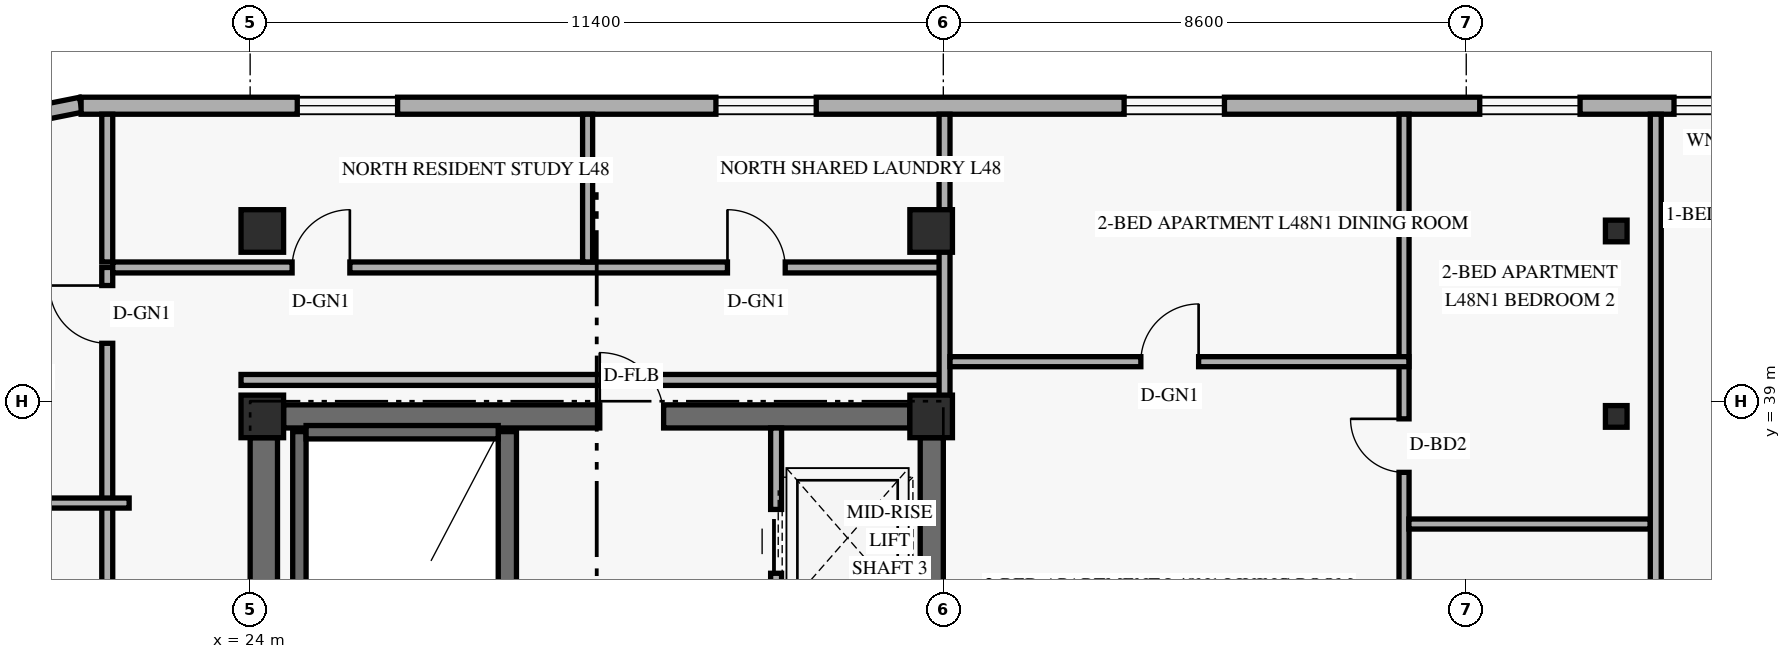
"""IFC4 building model, lengths in metres.
Left out: names, types, materials, properties, quantities, classifications, styles, units other than length and angle.
Written with IfcOpenShell. Run it as: python <this file> out.ifc"""

import sys

from ifc_helpers import new_model, si_unit, direction, frame, frame_2d, origin, origin_2d, place, context, subcontext, project, spatial, rectangle, hollow_rectangle, extrude, element, fill, save


model = new_model("IFC4")
c1 = context("Model", 3, precision=1e-05, world=origin(), true_north=direction((0.0, 1.0)))
c2 = subcontext(c1, "Body", "Model", "MODEL_VIEW")
j1 = project(units=[si_unit("LENGTHUNIT", "METRE"), si_unit("PLANEANGLEUNIT", "RADIAN")], contexts=[c1])
p1 = place(None, origin())
s1 = spatial("IfcSite", under=j1, at=p1, CompositionType="ELEMENT")
p2 = place(p1, origin())
s2 = spatial("IfcBuilding", under=s1, at=p2, CompositionType="ELEMENT")
p3 = place(p2, frame((0.0, 0.0, 184.8)))
s3 = spatial("IfcBuildingStorey", under=s2, at=p3, CompositionType="ELEMENT", Elevation=184.8)
p4 = place(p3, frame((24.225, 30.55, 0.0), z_axis=(0.0, 0.0, 1.0), x_axis=(0.0, 1.0, 0.0)))
e1 = element("IfcWall", 1, at=p4, inside=s3, PredefinedType="SHEAR", context=c2, shape_type="SweptSolid", body=[
    extrude(rectangle(XDim=7.85, YDim=0.45, at=frame_2d((3.925, 0.0))), origin(), (0.0, 0.0, 1.0), 2.748),
])
p5 = place(p3, frame((35.21, 31.35, 0.0), z_axis=(0.0, 0.0, 1.0), x_axis=(0.0, 1.0, 0.0)))
e2 = element("IfcWall", 2, at=p5, inside=s3, PredefinedType="SHEAR", context=c2, shape_type="SweptSolid", body=[
    extrude(rectangle(XDim=7.05, YDim=0.38, at=frame_2d((3.525, 0.0))), origin(), (0.0, 0.0, 1.0), 2.748),
])
p6 = place(p3, frame((24.55, 38.75, 0.0), z_axis=(0.0, 0.0, 1.0), x_axis=(1.0, 0.0, 0.0)))
e3 = element("IfcWall", 3, at=p6, inside=s3, PredefinedType="SHEAR", context=c2, shape_type="SweptSolid", body=[
    extrude(rectangle(XDim=10.3, YDim=0.38, at=frame_2d((5.15, 0.0))), origin(), (0.0, 0.0, 1.0), 3.36),
])
p7 = place(p6, frame((5.2, 0.0, 0.0)))
e4 = element("IfcOpeningElement", 4, at=p7, cuts=e3, PredefinedType="OPENING", context=c2, shape_type="SweptSolid", body=[
    extrude(rectangle(XDim=1.05, YDim=2.15, at=frame_2d((0.525, 1.075))), frame((0.0, 0.2, 0.0), z_axis=(0.0, -1.0, 0.0), x_axis=(1.0, 0.0, 0.0)), (0.0, 0.0, 1.0), 0.4),
])
p8 = place(p3, frame((24.81, 30.74, 0.0), z_axis=(0.0, 0.0, 1.0), x_axis=(0.0, 1.0, 0.0)))
e5 = element("IfcWall", 5, at=p8, inside=s3, PredefinedType="SHEAR", context=c2, shape_type="SweptSolid", body=[
    extrude(rectangle(XDim=7.76, YDim=0.22, at=frame_2d((3.88, 0.0))), origin(), (0.0, 0.0, 1.0), 3.36),
])
p9 = place(p3, frame((28.23, 30.74, 0.0), z_axis=(0.0, 0.0, 1.0), x_axis=(0.0, 1.0, 0.0)))
e6 = element("IfcWall", 6, at=p9, inside=s3, PredefinedType="SHEAR", context=c2, shape_type="SweptSolid", body=[
    extrude(rectangle(XDim=7.76, YDim=0.3, at=frame_2d((3.88, 0.0))), origin(), (0.0, 0.0, 1.0), 3.36),
])
p10 = place(p3, frame((24.92, 38.49, 0.0), z_axis=(0.0, 0.0, 1.0), x_axis=(1.0, 0.0, 0.0)))
e7 = element("IfcWall", 7, at=p10, inside=s3, PredefinedType="SHEAR", context=c2, shape_type="SweptSolid", body=[
    extrude(rectangle(XDim=3.16, YDim=0.22, at=frame_2d((1.58, 0.0))), origin(), (0.0, 0.0, 1.0), 3.36),
])
for number, where, z_axis, x_axis in (
    (8, (24.2, 38.75, 0.0), (0.0, 0.0, 1.0), (1.0, 0.0, 0.0)),
    (9, (24.2, 41.8, 0.0), (0.0, 0.0, 1.0), (1.0, 0.0, 0.0)),
    (10, (35.2, 38.75, 0.0), (0.0, 0.0, 1.0), (1.0, 0.0, 0.0)),
    (11, (35.2, 41.8, 0.0), (0.0, 0.0, 1.0), (1.0, 0.0, 0.0)),
):
    element("IfcColumn", number, at=place(p3, frame(where, z_axis=z_axis, x_axis=x_axis)), inside=s3, PredefinedType="COLUMN", context=c2, shape_type="SweptSolid", body=[
        extrude(rectangle(XDim=0.7, YDim=0.7, at=origin_2d()), origin(), (0.0, 0.0, 1.0), 3.6),
    ])
for number, where, z_axis, x_axis in (
    (12, (46.404, 38.75, 0.0), (0.035, 0.0, 0.999), (0.0, 1.0, 0.0)),
    (13, (46.404, 41.8, 0.0), (0.035, 0.0, 0.999), (0.0, 1.0, 0.0)),
):
    element("IfcColumn", number, at=place(p3, frame(where, z_axis=z_axis, x_axis=x_axis)), inside=s3, PredefinedType="COLUMN", context=c2, shape_type="SweptSolid", body=[
        extrude(hollow_rectangle(XDim=0.356, YDim=0.356, WallThickness=0.016, at=origin_2d()), origin(), (0.0, 0.0, 1.0), 3.602),
    ])
p11 = place(p3, frame((21.217, 43.876, 0.0), z_axis=(0.0, 0.0, 1.0), x_axis=(-0.980809899341, -0.19496651342, 0.0)))
e14 = element("IfcWall", 14, at=p11, inside=s3, PredefinedType="SOLIDWALL", context=c2, shape_type="SweptSolid", body=[
    extrude(rectangle(XDim=1.389, YDim=0.25, at=frame_2d((0.694, 0.0))), origin(), (0.0, 0.0, 1.0), 3.36),
])
p12 = place(p3, frame((54.98, 43.86, 0.0), z_axis=(0.0, 0.0, 1.0), x_axis=(-1.0, 0.0, 0.0)))
e15 = element("IfcWall", 15, at=p12, inside=s3, PredefinedType="SOLIDWALL", context=c2, shape_type="SweptSolid", body=[
    extrude(rectangle(XDim=33.76, YDim=0.28, at=frame_2d((16.88, 0.0))), origin(), (0.0, 0.0, 1.0), 3.36),
])
p13 = place(p12, frame((28.555, 0.0, 0.85)))
e16 = element("IfcOpeningElement", 16, at=p13, cuts=e15, PredefinedType="OPENING", context=c2, shape_type="SweptSolid", body=[
    extrude(rectangle(XDim=1.65, YDim=1.6, at=frame_2d((0.825, 0.8))), frame((0.0, 0.15, 0.0), z_axis=(0.0, -1.0, 0.0), x_axis=(1.0, 0.0, 0.0)), (0.0, 0.0, 1.0), 0.3),
])
p14 = place(p12, frame((21.67, 0.0, 0.85)))
e17 = element("IfcOpeningElement", 17, at=p14, cuts=e15, PredefinedType="OPENING", context=c2, shape_type="SweptSolid", body=[
    extrude(rectangle(XDim=1.65, YDim=1.6, at=frame_2d((0.825, 0.8))), frame((0.0, 0.15, 0.0), z_axis=(0.0, -1.0, 0.0), x_axis=(1.0, 0.0, 0.0)), (0.0, 0.0, 1.0), 0.3),
])
p15 = place(p12, frame((14.957, 0.0, 0.85)))
e18 = element("IfcOpeningElement", 18, at=p15, cuts=e15, PredefinedType="OPENING", context=c2, shape_type="SweptSolid", body=[
    extrude(rectangle(XDim=1.65, YDim=1.6, at=frame_2d((0.825, 0.8))), frame((0.0, 0.15, 0.0), z_axis=(0.0, -1.0, 0.0), x_axis=(1.0, 0.0, 0.0)), (0.0, 0.0, 1.0), 0.3),
])
p16 = place(p12, frame((9.108, 0.0, 0.85)))
e19 = element("IfcOpeningElement", 19, at=p16, cuts=e15, PredefinedType="OPENING", context=c2, shape_type="SweptSolid", body=[
    extrude(rectangle(XDim=1.65, YDim=1.6, at=frame_2d((0.825, 0.8))), frame((0.0, 0.15, 0.0), z_axis=(0.0, -1.0, 0.0), x_axis=(1.0, 0.0, 0.0)), (0.0, 0.0, 1.0), 0.3),
])
p17 = place(p12, frame((6.363, 0.0, 0.85)))
e20 = element("IfcOpeningElement", 20, at=p17, cuts=e15, PredefinedType="OPENING", context=c2, shape_type="SweptSolid", body=[
    extrude(rectangle(XDim=1.2, YDim=1.5, at=frame_2d((0.6, 0.75))), frame((0.0, 0.15, 0.0), z_axis=(0.0, -1.0, 0.0), x_axis=(1.0, 0.0, 0.0)), (0.0, 0.0, 1.0), 0.3),
])
p18 = place(p12, frame((2.207, 0.0, 0.85)))
e21 = element("IfcOpeningElement", 21, at=p18, cuts=e15, PredefinedType="OPENING", context=c2, shape_type="SweptSolid", body=[
    extrude(rectangle(XDim=1.65, YDim=1.6, at=frame_2d((0.825, 0.8))), frame((0.0, 0.15, 0.0), z_axis=(0.0, -1.0, 0.0), x_axis=(1.0, 0.0, 0.0)), (0.0, 0.0, 1.0), 0.3),
])
p19 = place(p3, frame((32.65, 31.35, 0.0), z_axis=(0.0, 0.0, 1.0), x_axis=(0.0, 1.0, 0.0)))
e22 = element("IfcWall", 22, at=p19, inside=s3, PredefinedType="STANDARD", context=c2, shape_type="SweptSolid", body=[
    extrude(rectangle(XDim=7.21, YDim=0.18, at=frame_2d((3.605, 0.0))), origin(), (0.0, 0.0, 1.0), 3.36),
])
p20 = place(p19, frame((0.52, 0.0, 0.0)))
e23 = element("IfcOpeningElement", 23, at=p20, cuts=e22, PredefinedType="OPENING", context=c2, shape_type="SweptSolid", body=[
    extrude(rectangle(XDim=1.05, YDim=2.2, at=frame_2d((0.525, 1.1))), frame((0.0, 0.1, 0.0), z_axis=(0.0, -1.0, 0.0), x_axis=(1.0, 0.0, 0.0)), (0.0, 0.0, 1.0), 0.2),
])
p21 = place(p19, frame((2.67, 0.0, 0.0)))
e24 = element("IfcOpeningElement", 24, at=p21, cuts=e22, PredefinedType="OPENING", context=c2, shape_type="SweptSolid", body=[
    extrude(rectangle(XDim=1.05, YDim=2.2, at=frame_2d((0.525, 1.1))), frame((0.0, 0.1, 0.0), z_axis=(0.0, -1.0, 0.0), x_axis=(1.0, 0.0, 0.0)), (0.0, 0.0, 1.0), 0.2),
])
p22 = place(p19, frame((4.82, 0.0, 0.0)))
e25 = element("IfcOpeningElement", 25, at=p22, cuts=e22, PredefinedType="OPENING", context=c2, shape_type="SweptSolid", body=[
    extrude(rectangle(XDim=1.05, YDim=2.2, at=frame_2d((0.525, 1.1))), frame((0.0, 0.1, 0.0), z_axis=(0.0, -1.0, 0.0), x_axis=(1.0, 0.0, 0.0)), (0.0, 0.0, 1.0), 0.2),
])
p23 = place(p3, frame((21.65, 6.8, 0.0), z_axis=(0.0, 0.0, 1.0), x_axis=(0.0, 1.0, 0.0)))
e26 = element("IfcWall", 26, at=p23, inside=s3, PredefinedType="STANDARD", context=c2, shape_type="SweptSolid", body=[
    extrude(rectangle(XDim=34.4, YDim=0.18, at=frame_2d((17.2, 0.0))), origin(), (0.0, 0.0, 1.0), 2.73),
])
p24 = place(p23, frame((0.433, 0.0, 0.0)))
e27 = element("IfcOpeningElement", 27, at=p24, cuts=e26, PredefinedType="OPENING", context=c2, shape_type="SweptSolid", body=[
    extrude(rectangle(XDim=0.95, YDim=2.15, at=frame_2d((0.475, 1.075))), frame((0.0, 0.1, 0.0), z_axis=(0.0, -1.0, 0.0), x_axis=(1.0, 0.0, 0.0)), (0.0, 0.0, 1.0), 0.2),
])
p25 = place(p23, frame((6.867, 0.0, 0.0)))
e28 = element("IfcOpeningElement", 28, at=p25, cuts=e26, PredefinedType="OPENING", context=c2, shape_type="SweptSolid", body=[
    extrude(rectangle(XDim=0.95, YDim=2.15, at=frame_2d((0.475, 1.075))), frame((0.0, 0.1, 0.0), z_axis=(0.0, -1.0, 0.0), x_axis=(1.0, 0.0, 0.0)), (0.0, 0.0, 1.0), 0.2),
])
p26 = place(p23, frame((13.17, 0.0, 0.0)))
e29 = element("IfcOpeningElement", 29, at=p26, cuts=e26, PredefinedType="OPENING", context=c2, shape_type="SweptSolid", body=[
    extrude(rectangle(XDim=0.95, YDim=2.15, at=frame_2d((0.475, 1.075))), frame((0.0, 0.1, 0.0), z_axis=(0.0, -1.0, 0.0), x_axis=(1.0, 0.0, 0.0)), (0.0, 0.0, 1.0), 0.2),
])
p27 = place(p23, frame((19.88, 0.0, 0.0)))
e30 = element("IfcOpeningElement", 30, at=p27, cuts=e26, PredefinedType="OPENING", context=c2, shape_type="SweptSolid", body=[
    extrude(rectangle(XDim=0.95, YDim=2.15, at=frame_2d((0.475, 1.075))), frame((0.0, 0.1, 0.0), z_axis=(0.0, -1.0, 0.0), x_axis=(1.0, 0.0, 0.0)), (0.0, 0.0, 1.0), 0.2),
])
p28 = place(p23, frame((26.857, 0.0, 0.0)))
e31 = element("IfcOpeningElement", 31, at=p28, cuts=e26, PredefinedType="OPENING", context=c2, shape_type="SweptSolid", body=[
    extrude(rectangle(XDim=0.95, YDim=2.15, at=frame_2d((0.475, 1.075))), frame((0.0, 0.1, 0.0), z_axis=(0.0, -1.0, 0.0), x_axis=(1.0, 0.0, 0.0)), (0.0, 0.0, 1.0), 0.2),
])
p29 = place(p23, frame((33.153, 0.0, 0.0)))
e32 = element("IfcOpeningElement", 32, at=p29, cuts=e26, PredefinedType="OPENING", context=c2, shape_type="SweptSolid", body=[
    extrude(rectangle(XDim=0.95, YDim=2.15, at=frame_2d((0.475, 1.075))), frame((0.0, 0.1, 0.0), z_axis=(0.0, -1.0, 0.0), x_axis=(1.0, 0.0, 0.0)), (0.0, 0.0, 1.0), 0.2),
])
p30 = place(p3, frame((21.74, 41.2, 0.0), z_axis=(0.0, 0.0, 1.0), x_axis=(1.0, 0.0, 0.0)))
e33 = element("IfcWall", 33, at=p30, inside=s3, PredefinedType="STANDARD", context=c2, shape_type="SweptSolid", body=[
    extrude(rectangle(XDim=13.68, YDim=0.18, at=frame_2d((6.84, 0.0))), origin(), (0.0, 0.0, 1.0), 2.73),
])
p31 = place(p30, frame((2.95, 0.0, 0.0)))
e34 = element("IfcOpeningElement", 34, at=p31, cuts=e33, PredefinedType="OPENING", context=c2, shape_type="SweptSolid", body=[
    extrude(rectangle(XDim=0.95, YDim=2.15, at=frame_2d((0.475, 1.075))), frame((0.0, 0.1, 0.0), z_axis=(0.0, -1.0, 0.0), x_axis=(1.0, 0.0, 0.0)), (0.0, 0.0, 1.0), 0.2),
])
p32 = place(p30, frame((10.11, 0.0, 0.0)))
e35 = element("IfcOpeningElement", 35, at=p32, cuts=e33, PredefinedType="OPENING", context=c2, shape_type="SweptSolid", body=[
    extrude(rectangle(XDim=0.95, YDim=2.15, at=frame_2d((0.475, 1.075))), frame((0.0, 0.1, 0.0), z_axis=(0.0, -1.0, 0.0), x_axis=(1.0, 0.0, 0.0)), (0.0, 0.0, 1.0), 0.2),
])
p33 = place(p3, frame((23.85, 39.35, 0.0), z_axis=(0.0, 0.0, 1.0), x_axis=(1.0, 0.0, 0.0)))
e36 = element("IfcWall", 36, at=p33, inside=s3, PredefinedType="STANDARD", context=c2, shape_type="SweptSolid", body=[
    extrude(rectangle(XDim=11.57, YDim=0.18, at=frame_2d((5.785, 0.0))), origin(), (0.0, 0.0, 1.0), 2.73),
])
p34 = place(p3, frame((21.65, 41.29, 0.0), z_axis=(0.0, 0.0, 1.0), x_axis=(0.0, 1.0, 0.0)))
e37 = element("IfcWall", 37, at=p34, inside=s3, PredefinedType="PARTITIONING", context=c2, shape_type="SweptSolid", body=[
    extrude(rectangle(XDim=2.43, YDim=0.18, at=frame_2d((1.215, 0.0))), origin(), (0.0, 0.0, 1.0), 2.879),
])
p35 = place(p3, frame((35.42, 38.75, 0.0), z_axis=(0.0, 0.0, 1.0), x_axis=(0.0, 1.0, 0.0)))
e38 = element("IfcWall", 38, at=p35, inside=s3, PredefinedType="PARTITIONING", context=c2, shape_type="SweptSolid", body=[
    extrude(rectangle(XDim=4.97, YDim=0.18, at=frame_2d((2.485, 0.0))), origin(), (0.0, 0.0, 1.0), 2.73),
])
p36 = place(p3, frame((42.977, 29.55, 0.0), z_axis=(0.0, 0.0, 1.0), x_axis=(0.0, 1.0, 0.0)))
e39 = element("IfcWall", 39, at=p36, inside=s3, PredefinedType="PARTITIONING", context=c2, shape_type="SweptSolid", body=[
    extrude(rectangle(XDim=14.17, YDim=0.165, at=frame_2d((7.085, 0.0))), origin(), (0.0, 0.0, 1.0), 2.73),
])
p37 = place(p36, frame((4.593, 0.0, 0.0)))
e40 = element("IfcOpeningElement", 40, at=p37, cuts=e39, PredefinedType="OPENING", context=c2, shape_type="SweptSolid", body=[
    extrude(rectangle(XDim=0.88, YDim=2.14, at=frame_2d((0.44, 1.07))), frame((0.0, 0.093, 0.0), z_axis=(0.0, -1.0, 0.0), x_axis=(1.0, 0.0, 0.0)), (0.0, 0.0, 1.0), 0.185),
])
p38 = place(p36, frame((8.28, 0.0, 0.0)))
e41 = element("IfcOpeningElement", 41, at=p38, cuts=e39, PredefinedType="OPENING", context=c2, shape_type="SweptSolid", body=[
    extrude(rectangle(XDim=0.88, YDim=2.14, at=frame_2d((0.44, 1.07))), frame((0.0, 0.093, 0.0), z_axis=(0.0, -1.0, 0.0), x_axis=(1.0, 0.0, 0.0)), (0.0, 0.0, 1.0), 0.185),
])
p39 = place(p3, frame((35.51, 39.65, 0.0), z_axis=(0.0, 0.0, 1.0), x_axis=(1.0, 0.0, 0.0)))
e42 = element("IfcWall", 42, at=p39, inside=s3, PredefinedType="PARTITIONING", context=c2, shape_type="SweptSolid", body=[
    extrude(rectangle(XDim=7.547, YDim=0.165, at=frame_2d((3.773, 0.0))), origin(), (0.0, 0.0, 1.0), 3.36),
])
p40 = place(p39, frame((3.138, 0.0, 0.0)))
e43 = element("IfcOpeningElement", 43, at=p40, cuts=e42, PredefinedType="OPENING", context=c2, shape_type="SweptSolid", body=[
    extrude(rectangle(XDim=0.95, YDim=2.15, at=frame_2d((0.475, 1.075))), frame((0.0, 0.093, 0.0), z_axis=(0.0, -1.0, 0.0), x_axis=(1.0, 0.0, 0.0)), (0.0, 0.0, 1.0), 0.185),
])
p41 = place(p3, frame((43.057, 36.98, 0.0), z_axis=(0.0, 0.0, 1.0), x_axis=(1.0, 0.0, 0.0)))
e44 = element("IfcWall", 44, at=p41, inside=s3, PredefinedType="PARTITIONING", context=c2, shape_type="SweptSolid", body=[
    extrude(rectangle(XDim=3.97, YDim=0.165, at=frame_2d((1.985, 0.0))), origin(), (0.0, 0.0, 1.0), 2.73),
])
p42 = place(p3, frame((47.117, 29.55, 0.0), z_axis=(0.0, 0.0, 1.0), x_axis=(0.0, 1.0, 0.0)))
e45 = element("IfcWall", 45, at=p42, inside=s3, PredefinedType="STANDARD", context=c2, shape_type="SweptSolid", body=[
    extrude(rectangle(XDim=14.17, YDim=0.18, at=frame_2d((7.085, 0.0))), origin(), (0.0, 0.0, 1.0), 2.73),
])
p43 = place(p3, frame((17.88, 37.325, 0.0), z_axis=(0.0, 0.0, 1.0), x_axis=(1.0, 0.0, 0.0)))
e46 = element("IfcWall", 46, at=p43, inside=s3, PredefinedType="PARTITIONING", context=c2, shape_type="SweptSolid", body=[
    extrude(rectangle(XDim=4.13, YDim=0.165, at=frame_2d((2.065, 0.0))), origin(), (0.0, 0.0, 1.0), 2.879),
])
p44 = place(p3, frame((29.55, 41.29, 0.0), z_axis=(0.0, 0.0, 1.0), x_axis=(0.0, 1.0, 0.0)))
e47 = element("IfcWall", 47, at=p44, inside=s3, PredefinedType="PARTITIONING", context=c2, shape_type="SweptSolid", body=[
    extrude(rectangle(XDim=2.43, YDim=0.165, at=frame_2d((1.215, 0.0))), origin(), (0.0, 0.0, 1.0), 2.879),
])
p45 = place(p13, origin())
e48 = element("IfcWindow", 48, at=p45, inside=s3, PartitioningType="SINGLE_PANEL", PredefinedType="WINDOW", context=c2, shape_type="SweptSolid", body=[
    extrude(rectangle(XDim=1.65, YDim=1.6, at=frame_2d((0.825, 0.8))), frame((0.0, 0.03, 0.0), z_axis=(0.0, -1.0, 0.0), x_axis=(1.0, 0.0, 0.0)), (0.0, 0.0, 1.0), 0.06),
])
fill(e16, e48)
p46 = place(p14, origin())
e49 = element("IfcWindow", 49, at=p46, inside=s3, PartitioningType="SINGLE_PANEL", PredefinedType="WINDOW", context=c2, shape_type="SweptSolid", body=[
    extrude(rectangle(XDim=1.65, YDim=1.6, at=frame_2d((0.825, 0.8))), frame((0.0, 0.03, 0.0), z_axis=(0.0, -1.0, 0.0), x_axis=(1.0, 0.0, 0.0)), (0.0, 0.0, 1.0), 0.06),
])
fill(e17, e49)
p47 = place(p15, origin())
e50 = element("IfcWindow", 50, at=p47, inside=s3, PartitioningType="SINGLE_PANEL", PredefinedType="WINDOW", context=c2, shape_type="SweptSolid", body=[
    extrude(rectangle(XDim=1.65, YDim=1.6, at=frame_2d((0.825, 0.8))), frame((0.0, 0.03, 0.0), z_axis=(0.0, -1.0, 0.0), x_axis=(1.0, 0.0, 0.0)), (0.0, 0.0, 1.0), 0.06),
])
fill(e18, e50)
p48 = place(p16, origin())
e51 = element("IfcWindow", 51, at=p48, inside=s3, PartitioningType="SINGLE_PANEL", PredefinedType="WINDOW", context=c2, shape_type="SweptSolid", body=[
    extrude(rectangle(XDim=1.65, YDim=1.6, at=frame_2d((0.825, 0.8))), frame((0.0, 0.03, 0.0), z_axis=(0.0, -1.0, 0.0), x_axis=(1.0, 0.0, 0.0)), (0.0, 0.0, 1.0), 0.06),
])
fill(e19, e51)
p49 = place(p17, origin())
e52 = element("IfcWindow", 52, at=p49, inside=s3, PartitioningType="SINGLE_PANEL", PredefinedType="WINDOW", context=c2, shape_type="SweptSolid", body=[
    extrude(rectangle(XDim=1.2, YDim=1.5, at=frame_2d((0.6, 0.75))), frame((0.0, 0.03, 0.0), z_axis=(0.0, -1.0, 0.0), x_axis=(1.0, 0.0, 0.0)), (0.0, 0.0, 1.0), 0.06),
])
fill(e20, e52)
p50 = place(p22, origin())
e53 = element("IfcDoor", 53, at=p50, inside=s3, OperationType="SLIDING_TO_LEFT", PredefinedType="DOOR", context=c2, shape_type="SweptSolid", body=[
    extrude(rectangle(XDim=1.05, YDim=2.2, at=frame_2d((0.525, 1.1))), frame((0.0, 0.025, 0.0), z_axis=(0.0, -1.0, 0.0), x_axis=(1.0, 0.0, 0.0)), (0.0, 0.0, 1.0), 0.05),
])
fill(e25, e53)
p51 = place(p7, frame((1.05, 0.0, 0.0), z_axis=(0.0, 0.0, 1.0), x_axis=(-1.0, 0.0, 0.0)))
e54 = element("IfcDoor", 54, at=p51, inside=s3, OperationType="SINGLE_SWING_RIGHT", PredefinedType="DOOR", context=c2, shape_type="SweptSolid", body=[
    extrude(rectangle(XDim=1.05, YDim=2.15, at=frame_2d((0.525, 1.075))), frame((0.0, 0.025, 0.0), z_axis=(0.0, -1.0, 0.0), x_axis=(1.0, 0.0, 0.0)), (0.0, 0.0, 1.0), 0.05),
])
fill(e4, e54)
p52 = place(p40, origin())
e55 = element("IfcDoor", 55, at=p52, inside=s3, OperationType="SINGLE_SWING_RIGHT", PredefinedType="DOOR", context=c2, shape_type="SweptSolid", body=[
    extrude(rectangle(XDim=0.95, YDim=2.15, at=frame_2d((0.475, 1.075))), frame((0.0, 0.025, 0.0), z_axis=(0.0, -1.0, 0.0), x_axis=(1.0, 0.0, 0.0)), (0.0, 0.0, 1.0), 0.05),
])
fill(e43, e55)
p53 = place(p38, origin())
e56 = element("IfcDoor", 56, at=p53, inside=s3, OperationType="SINGLE_SWING_RIGHT", PredefinedType="DOOR", context=c2, shape_type="SweptSolid", body=[
    extrude(rectangle(XDim=0.88, YDim=2.14, at=frame_2d((0.44, 1.07))), frame((0.0, 0.025, 0.0), z_axis=(0.0, -1.0, 0.0), x_axis=(1.0, 0.0, 0.0)), (0.0, 0.0, 1.0), 0.05),
])
fill(e41, e56)
p54 = place(p29, origin())
e57 = element("IfcDoor", 57, at=p54, inside=s3, OperationType="SINGLE_SWING_RIGHT", PredefinedType="DOOR", context=c2, shape_type="SweptSolid", body=[
    extrude(rectangle(XDim=0.95, YDim=2.15, at=frame_2d((0.475, 1.075))), frame((0.0, 0.025, 0.0), z_axis=(0.0, -1.0, 0.0), x_axis=(1.0, 0.0, 0.0)), (0.0, 0.0, 1.0), 0.05),
])
fill(e32, e57)
p55 = place(p31, origin())
e58 = element("IfcDoor", 58, at=p55, inside=s3, OperationType="SINGLE_SWING_RIGHT", PredefinedType="DOOR", context=c2, shape_type="SweptSolid", body=[
    extrude(rectangle(XDim=0.95, YDim=2.15, at=frame_2d((0.475, 1.075))), frame((0.0, 0.025, 0.0), z_axis=(0.0, -1.0, 0.0), x_axis=(1.0, 0.0, 0.0)), (0.0, 0.0, 1.0), 0.05),
])
fill(e34, e58)
p56 = place(p32, origin())
e59 = element("IfcDoor", 59, at=p56, inside=s3, OperationType="SINGLE_SWING_LEFT", PredefinedType="DOOR", context=c2, shape_type="SweptSolid", body=[
    extrude(rectangle(XDim=0.95, YDim=2.15, at=frame_2d((0.475, 1.075))), frame((0.0, 0.025, 0.0), z_axis=(0.0, -1.0, 0.0), x_axis=(1.0, 0.0, 0.0)), (0.0, 0.0, 1.0), 0.05),
])
fill(e35, e59)
save(model, sys.argv[1])
